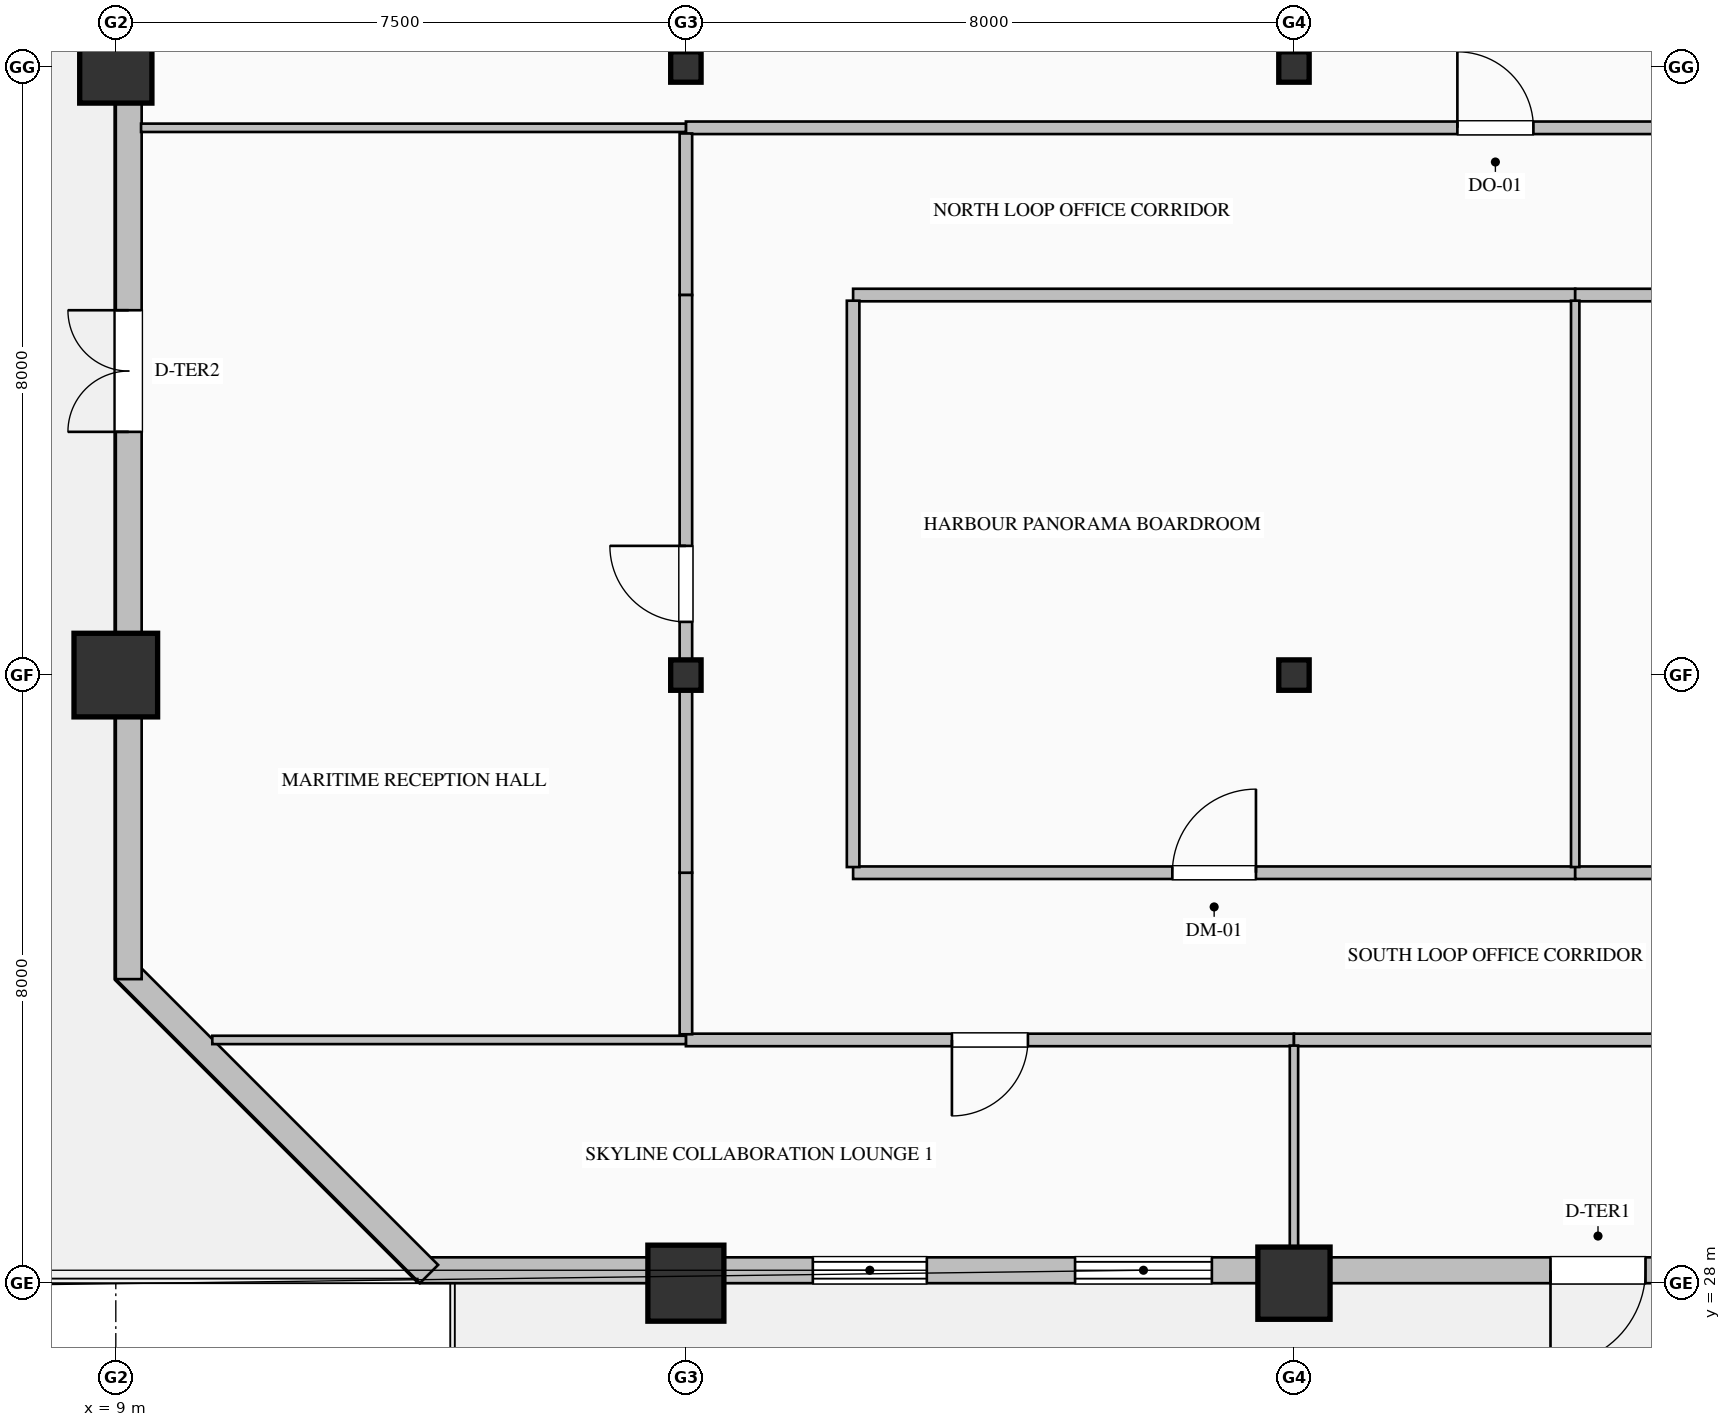
"""IFC4 building model, lengths in metres.
Left out: names, types, materials, properties, quantities, classifications, styles, units other than length and angle.
Written with IfcOpenShell. Run it as: python <this file> out.ifc"""

import sys

from ifc_helpers import new_model, si_unit, direction, frame, frame_2d, origin, origin_2d, place, context, subcontext, project, spatial, rectangle, hollow_rectangle, hollow_circle, i_section, extrude, element, fill, save


model = new_model("IFC4")
c1 = context("Model", 3, precision=1e-05, world=origin(), true_north=direction((0.0, 1.0)))
c2 = subcontext(c1, "Body", "Model", "MODEL_VIEW")
j1 = project(units=[si_unit("LENGTHUNIT", "METRE"), si_unit("PLANEANGLEUNIT", "RADIAN")], contexts=[c1])
p1 = place(None, origin())
s1 = spatial("IfcSite", under=j1, at=p1, CompositionType="ELEMENT")
p2 = place(p1, origin())
s2 = spatial("IfcBuilding", under=s1, at=p2, CompositionType="ELEMENT")
p3 = place(p2, frame((0.0, 0.0, 113.6)))
s3 = spatial("IfcBuildingStorey", under=s2, at=p3, CompositionType="ELEMENT", Elevation=113.6)
p4 = place(p3, frame((9.0, 36.0, 0.0), z_axis=(0.0, 0.0, 1.0), x_axis=(1.0, 0.0, 0.0)))
e1 = element("IfcColumn", 1, at=p4, inside=s3, PredefinedType="COLUMN", context=c2, shape_type="SweptSolid", body=[
    extrude(hollow_rectangle(XDim=1.1, YDim=1.1, WallThickness=0.04, at=origin_2d()), origin(), (0.0, 0.0, 1.0), 5.4),
])
p5 = place(p3, frame((9.0, 44.0, 0.0), z_axis=(0.0, 0.0, 1.0), x_axis=(1.0, 0.0, 0.0)))
e2 = element("IfcColumn", 2, at=p5, inside=s3, PredefinedType="COLUMN", context=c2, shape_type="SweptSolid", body=[
    extrude(hollow_rectangle(XDim=0.95, YDim=0.95, WallThickness=0.036, at=origin_2d()), origin(), (0.0, 0.0, 1.0), 5.4),
])
p6 = place(p3, frame((16.5, 28.0, 0.0), z_axis=(0.0, 0.0, 1.0), x_axis=(1.0, 0.0, 0.0)))
e3 = element("IfcColumn", 3, at=p6, inside=s3, PredefinedType="COLUMN", context=c2, shape_type="SweptSolid", body=[
    extrude(hollow_circle(Radius=0.5, WallThickness=0.036, at=origin_2d()), origin(), (0.0, 0.0, 1.0), 5.4),
])
for number, where, z_axis, x_axis in (
    (4, (16.5, 36.0, 0.0), (0.0, 0.0, 1.0), (1.0, 0.0, 0.0)),
    (5, (16.5, 44.0, 0.0), (0.0, 0.0, 1.0), (1.0, 0.0, 0.0)),
):
    element("IfcColumn", number, at=place(p3, frame(where, z_axis=z_axis, x_axis=x_axis)), inside=s3, PredefinedType="COLUMN", context=c2, shape_type="SweptSolid", body=[
        extrude(i_section(OverallWidth=0.4, OverallDepth=0.4, WebThickness=0.013, FlangeThickness=0.021, FilletRadius=0.022, at=origin_2d()), origin(), (0.0, 0.0, 1.0), 5.4),
    ])
p7 = place(p3, frame((24.5, 28.0, 0.0), z_axis=(0.0, 0.0, 1.0), x_axis=(1.0, 0.0, 0.0)))
e6 = element("IfcColumn", 6, at=p7, inside=s3, PredefinedType="COLUMN", context=c2, shape_type="SweptSolid", body=[
    extrude(hollow_rectangle(XDim=0.95, YDim=0.95, WallThickness=0.036, at=origin_2d()), origin(), (0.0, 0.0, 1.0), 5.4),
])
for number, where, z_axis, x_axis in (
    (7, (24.5, 36.0, 0.0), (0.0, 0.0, 1.0), (1.0, 0.0, 0.0)),
    (8, (24.5, 44.0, 0.0), (0.0, 0.0, 1.0), (1.0, 0.0, 0.0)),
):
    element("IfcColumn", number, at=place(p3, frame(where, z_axis=z_axis, x_axis=x_axis)), inside=s3, PredefinedType="COLUMN", context=c2, shape_type="SweptSolid", body=[
        extrude(i_section(OverallWidth=0.4, OverallDepth=0.4, WebThickness=0.013, FlangeThickness=0.021, FilletRadius=0.022, at=origin_2d()), origin(), (0.0, 0.0, 1.0), 5.4),
    ])
p8 = place(p3, frame((40.52, 28.17, 0.0), z_axis=(0.0, 0.0, 1.0), x_axis=(-1.0, 0.0, 0.0)))
e9 = element("IfcWall", 9, at=p8, inside=s3, PredefinedType="SOLIDWALL", context=c2, shape_type="SweptSolid", body=[
    extrude(rectangle(XDim=27.52, YDim=0.34, at=frame_2d((13.76, 0.0))), origin(), (0.0, 0.0, 1.0), 4.565),
])
p9 = place(p8, frame((17.1, 0.0, 0.65)))
e10 = element("IfcOpeningElement", 10, at=p9, cuts=e9, PredefinedType="OPENING", context=c2, shape_type="SweptSolid", body=[
    extrude(rectangle(XDim=1.8, YDim=2.55, at=frame_2d((0.9, 1.275))), frame((0.0, 0.18, 0.0), z_axis=(0.0, -1.0, 0.0), x_axis=(1.0, 0.0, 0.0)), (0.0, 0.0, 1.0), 0.36),
])
p10 = place(p8, frame((20.85, 0.0, 0.85)))
e11 = element("IfcOpeningElement", 11, at=p10, cuts=e9, PredefinedType="OPENING", context=c2, shape_type="SweptSolid", body=[
    extrude(rectangle(XDim=1.5, YDim=1.95, at=frame_2d((0.75, 0.975))), frame((0.0, 0.18, 0.0), z_axis=(0.0, -1.0, 0.0), x_axis=(1.0, 0.0, 0.0)), (0.0, 0.0, 1.0), 0.36),
])
p11 = place(p8, frame((11.395, 0.0, 0.0)))
e12 = element("IfcOpeningElement", 12, at=p11, cuts=e9, PredefinedType="OPENING", context=c2, shape_type="SweptSolid", body=[
    extrude(rectangle(XDim=1.25, YDim=2.25, at=frame_2d((0.625, 1.125))), frame((0.0, 0.18, 0.0), z_axis=(0.0, -1.0, 0.0), x_axis=(1.0, 0.0, 0.0)), (0.0, 0.0, 1.0), 0.36),
])
p12 = place(p3, frame((13.12, 28.12, 0.0), z_axis=(0.0, 0.0, 1.0), x_axis=(-0.707106781187, 0.707106781187, 0.0)))
e13 = element("IfcWall", 13, at=p12, inside=s3, PredefinedType="SOLIDWALL", context=c2, shape_type="SweptSolid", body=[
    extrude(rectangle(XDim=5.657, YDim=0.34, at=frame_2d((2.828, 0.0))), origin(), (0.0, 0.0, 1.0), 5.165),
])
p13 = place(p3, frame((9.17, 32.0, 0.0), z_axis=(0.0, 0.0, 1.0), x_axis=(0.0, 1.0, 0.0)))
e14 = element("IfcWall", 14, at=p13, inside=s3, PredefinedType="SOLIDWALL", context=c2, shape_type="SweptSolid", body=[
    extrude(rectangle(XDim=16.0, YDim=0.34, at=frame_2d((8.0, 0.0))), origin(), (0.0, 0.0, 1.0), 4.665),
])
p14 = place(p13, frame((7.2, 0.0, 0.0)))
e15 = element("IfcOpeningElement", 15, at=p14, cuts=e14, PredefinedType="OPENING", context=c2, shape_type="SweptSolid", body=[
    extrude(rectangle(XDim=1.6, YDim=2.35, at=frame_2d((0.8, 1.175))), frame((0.0, 0.18, 0.0), z_axis=(0.0, -1.0, 0.0), x_axis=(1.0, 0.0, 0.0)), (0.0, 0.0, 1.0), 0.36),
])
p15 = place(p3, frame((18.7, 33.4, 0.0), z_axis=(0.0, 0.0, 1.0), x_axis=(1.0, 0.0, 0.0)))
e16 = element("IfcWall", 16, at=p15, inside=s3, PredefinedType="PARTITIONING", context=c2, shape_type="SweptSolid", body=[
    extrude(rectangle(XDim=9.5, YDim=0.165, at=frame_2d((4.75, 0.0))), origin(), (0.0, 0.0, 1.0), 5.165),
])
p16 = place(p15, frame((4.2, 0.0, 0.0)))
e17 = element("IfcOpeningElement", 17, at=p16, cuts=e16, PredefinedType="OPENING", context=c2, shape_type="SweptSolid", body=[
    extrude(rectangle(XDim=1.1, YDim=2.2, at=frame_2d((0.55, 1.1))), frame((0.0, 0.093, 0.0), z_axis=(0.0, -1.0, 0.0), x_axis=(1.0, 0.0, 0.0)), (0.0, 0.0, 1.0), 0.185),
])
p17 = place(p3, frame((28.2, 33.4, 0.0), z_axis=(0.0, 0.0, 1.0), x_axis=(1.0, 0.0, 0.0)))
e18 = element("IfcWall", 18, at=p17, inside=s3, PredefinedType="PARTITIONING", context=c2, shape_type="SweptSolid", body=[
    extrude(rectangle(XDim=9.6, YDim=0.165, at=frame_2d((4.8, 0.0))), origin(), (0.0, 0.0, 1.0), 5.165),
])
p18 = place(p17, frame((4.3, 0.0, 0.0)))
e19 = element("IfcOpeningElement", 19, at=p18, cuts=e18, PredefinedType="OPENING", context=c2, shape_type="SweptSolid", body=[
    extrude(rectangle(XDim=1.0, YDim=2.15, at=frame_2d((0.5, 1.075))), frame((0.0, 0.093, 0.0), z_axis=(0.0, -1.0, 0.0), x_axis=(1.0, 0.0, 0.0)), (0.0, 0.0, 1.0), 0.185),
])
p19 = place(p3, frame((24.5, 31.2, 0.0), z_axis=(0.0, 0.0, 1.0), x_axis=(-1.0, 0.0, 0.0)))
e20 = element("IfcWall", 20, at=p19, inside=s3, PredefinedType="PARTITIONING", context=c2, shape_type="SweptSolid", body=[
    extrude(rectangle(XDim=8.0, YDim=0.165, at=frame_2d((4.0, 0.0))), origin(), (0.0, 0.0, 1.0), 5.165),
])
p20 = place(p19, frame((3.5, 0.0, 0.0)))
e21 = element("IfcOpeningElement", 21, at=p20, cuts=e20, PredefinedType="OPENING", context=c2, shape_type="SweptSolid", body=[
    extrude(rectangle(XDim=1.0, YDim=2.15, at=frame_2d((0.5, 1.075))), frame((0.0, 0.093, 0.0), z_axis=(0.0, -1.0, 0.0), x_axis=(1.0, 0.0, 0.0)), (0.0, 0.0, 1.0), 0.185),
])
p21 = place(p3, frame((37.8, 31.2, 0.0), z_axis=(0.0, 0.0, 1.0), x_axis=(-1.0, 0.0, 0.0)))
e22 = element("IfcWall", 22, at=p21, inside=s3, PredefinedType="PARTITIONING", context=c2, shape_type="SweptSolid", body=[
    extrude(rectangle(XDim=13.3, YDim=0.165, at=frame_2d((6.65, 0.0))), origin(), (0.0, 0.0, 1.0), 5.165),
])
p22 = place(p21, frame((6.15, 0.0, 0.0)))
e23 = element("IfcOpeningElement", 23, at=p22, cuts=e22, PredefinedType="OPENING", context=c2, shape_type="SweptSolid", body=[
    extrude(rectangle(XDim=1.0, YDim=2.15, at=frame_2d((0.5, 1.075))), frame((0.0, 0.093, 0.0), z_axis=(0.0, -1.0, 0.0), x_axis=(1.0, 0.0, 0.0)), (0.0, 0.0, 1.0), 0.185),
])
p23 = place(p3, frame((16.5, 31.274, 0.0), z_axis=(0.0, 0.0, 1.0), x_axis=(0.0, 1.0, 0.0)))
e24 = element("IfcWall", 24, at=p23, inside=s3, PredefinedType="PARTITIONING", context=c2, shape_type="SweptSolid", body=[
    extrude(rectangle(XDim=2.125, YDim=0.165, at=frame_2d((1.063, 0.0))), origin(), (0.0, 0.0, 1.0), 4.557),
])
p24 = place(p3, frame((16.5, 43.2, 0.0), z_axis=(0.0, 0.0, 1.0), x_axis=(1.0, 0.0, 0.0)))
e25 = element("IfcWall", 25, at=p24, inside=s3, PredefinedType="PARTITIONING", context=c2, shape_type="SweptSolid", body=[
    extrude(rectangle(XDim=21.3, YDim=0.165, at=frame_2d((10.65, 0.0))), origin(), (0.0, 0.0, 1.0), 5.165),
])
p25 = place(p24, frame((10.15, 0.0, 0.0)))
e26 = element("IfcOpeningElement", 26, at=p25, cuts=e25, PredefinedType="OPENING", context=c2, shape_type="SweptSolid", body=[
    extrude(rectangle(XDim=1.0, YDim=2.15, at=frame_2d((0.5, 1.075))), frame((0.0, 0.093, 0.0), z_axis=(0.0, -1.0, 0.0), x_axis=(1.0, 0.0, 0.0)), (0.0, 0.0, 1.0), 0.185),
])
p26 = place(p3, frame((28.2, 41.0, 0.0), z_axis=(0.0, 0.0, 1.0), x_axis=(-1.0, 0.0, 0.0)))
e27 = element("IfcWall", 27, at=p26, inside=s3, PredefinedType="PARTITIONING", context=c2, shape_type="SweptSolid", body=[
    extrude(rectangle(XDim=9.5, YDim=0.165, at=frame_2d((4.75, 0.0))), origin(), (0.0, 0.0, 1.0), 5.165),
])
p27 = place(p3, frame((37.8, 41.0, 0.0), z_axis=(0.0, 0.0, 1.0), x_axis=(-1.0, 0.0, 0.0)))
e28 = element("IfcWall", 28, at=p27, inside=s3, PredefinedType="PARTITIONING", context=c2, shape_type="SweptSolid", body=[
    extrude(rectangle(XDim=9.6, YDim=0.165, at=frame_2d((4.8, 0.0))), origin(), (0.0, 0.0, 1.0), 5.165),
])
p28 = place(p3, frame((16.5, 41.0, 0.0), z_axis=(0.0, 0.0, 1.0), x_axis=(0.0, 1.0, 0.0)))
e29 = element("IfcWall", 29, at=p28, inside=s3, PredefinedType="PARTITIONING", context=c2, shape_type="SweptSolid", body=[
    extrude(rectangle(XDim=2.125, YDim=0.165, at=frame_2d((1.063, 0.0))), origin(), (0.0, 0.0, 1.0), 4.557),
])
p29 = place(p3, frame((18.7, 40.926, 0.0), z_axis=(0.0, 0.0, 1.0), x_axis=(0.0, -1.0, 0.0)))
e30 = element("IfcWall", 30, at=p29, inside=s3, PredefinedType="PARTITIONING", context=c2, shape_type="SweptSolid", body=[
    extrude(rectangle(XDim=7.451, YDim=0.165, at=frame_2d((3.726, 0.0))), origin(), (0.0, 0.0, 1.0), 5.165),
])
p30 = place(p3, frame((16.5, 33.4, 0.0), z_axis=(0.0, 0.0, 1.0), x_axis=(0.0, 1.0, 0.0)))
e31 = element("IfcWall", 31, at=p30, inside=s3, PredefinedType="PARTITIONING", context=c2, shape_type="SweptSolid", body=[
    extrude(rectangle(XDim=7.6, YDim=0.165, at=frame_2d((3.8, 0.0))), origin(), (0.0, 0.0, 1.0), 4.557),
])
p31 = place(p30, frame((3.3, 0.0, 0.0)))
e32 = element("IfcOpeningElement", 32, at=p31, cuts=e31, PredefinedType="OPENING", context=c2, shape_type="SweptSolid", body=[
    extrude(rectangle(XDim=1.0, YDim=2.15, at=frame_2d((0.5, 1.075))), frame((0.0, 0.093, 0.0), z_axis=(0.0, -1.0, 0.0), x_axis=(1.0, 0.0, 0.0)), (0.0, 0.0, 1.0), 0.185),
])
p32 = place(p3, frame((16.5, 43.2, 0.0), z_axis=(0.0, 0.0, 1.0), x_axis=(-1.0, 0.0, 0.0)))
e33 = element("IfcWall", 33, at=p32, inside=s3, PredefinedType="MOVABLE", context=c2, shape_type="SweptSolid", body=[
    extrude(rectangle(XDim=7.168, YDim=0.11, at=frame_2d((3.584, 0.0))), origin(), (0.0, 0.0, 1.0), 5.165),
])
p33 = place(p3, frame((28.2, 40.926, 0.0), z_axis=(0.0, 0.0, 1.0), x_axis=(0.0, -1.0, 0.0)))
e34 = element("IfcWall", 34, at=p33, inside=s3, PredefinedType="MOVABLE", context=c2, shape_type="SweptSolid", body=[
    extrude(rectangle(XDim=7.451, YDim=0.11, at=frame_2d((3.726, 0.0))), origin(), (0.0, 0.0, 1.0), 5.165),
])
p34 = place(p3, frame((24.5, 31.125, 0.0), z_axis=(0.0, 0.0, 1.0), x_axis=(0.0, -1.0, 0.0)))
e35 = element("IfcWall", 35, at=p34, inside=s3, PredefinedType="MOVABLE", context=c2, shape_type="SweptSolid", body=[
    extrude(rectangle(XDim=2.793, YDim=0.11, at=frame_2d((1.397, 0.0))), origin(), (0.0, 0.0, 1.0), 4.557),
])
p35 = place(p3, frame((10.27, 31.2, 0.0), z_axis=(0.0, 0.0, 1.0), x_axis=(1.0, 0.0, 0.0)))
e36 = element("IfcWall", 36, at=p35, inside=s3, PredefinedType="MOVABLE", context=c2, shape_type="SweptSolid", body=[
    extrude(rectangle(XDim=6.23, YDim=0.11, at=frame_2d((3.115, 0.0))), origin(), (0.0, 0.0, 1.0), 5.165),
])
p36 = place(p9, origin())
e37 = element("IfcWindow", 37, at=p36, inside=s3, PartitioningType="TRIPLE_PANEL_VERTICAL", PredefinedType="WINDOW", context=c2, shape_type="SweptSolid", body=[
    extrude(rectangle(XDim=1.8, YDim=2.55, at=frame_2d((0.9, 1.275))), frame((0.0, 0.15, 0.0), z_axis=(0.0, -1.0, 0.0), x_axis=(1.0, 0.0, 0.0)), (0.0, 0.0, 1.0), 0.06),
])
fill(e10, e37)
p37 = place(p10, origin())
e38 = element("IfcWindow", 38, at=p37, inside=s3, PartitioningType="DOUBLE_PANEL_VERTICAL", PredefinedType="WINDOW", context=c2, shape_type="SweptSolid", body=[
    extrude(rectangle(XDim=1.5, YDim=1.95, at=frame_2d((0.75, 0.975))), frame((0.0, 0.15, 0.0), z_axis=(0.0, -1.0, 0.0), x_axis=(1.0, 0.0, 0.0)), (0.0, 0.0, 1.0), 0.06),
])
fill(e11, e38)
p38 = place(p14, origin())
e39 = element("IfcDoor", 39, at=p38, inside=s3, OperationType="DOUBLE_DOOR_SINGLE_SWING", PredefinedType="DOOR", context=c2, shape_type="SweptSolid", body=[
    extrude(rectangle(XDim=1.6, YDim=2.35, at=frame_2d((0.8, 1.175))), frame((0.0, 0.025, 0.0), z_axis=(0.0, -1.0, 0.0), x_axis=(1.0, 0.0, 0.0)), (0.0, 0.0, 1.0), 0.05),
])
fill(e15, e39)
p39 = place(p11, origin())
e40 = element("IfcDoor", 40, at=p39, inside=s3, OperationType="SINGLE_SWING_RIGHT", PredefinedType="DOOR", context=c2, shape_type="SweptSolid", body=[
    extrude(rectangle(XDim=1.25, YDim=2.25, at=frame_2d((0.625, 1.125))), frame((0.0, 0.025, 0.0), z_axis=(0.0, -1.0, 0.0), x_axis=(1.0, 0.0, 0.0)), (0.0, 0.0, 1.0), 0.05),
])
fill(e12, e40)
p40 = place(p25, origin())
e41 = element("IfcDoor", 41, at=p40, inside=s3, OperationType="SINGLE_SWING_LEFT", PredefinedType="DOOR", context=c2, shape_type="SweptSolid", body=[
    extrude(rectangle(XDim=1.0, YDim=2.15, at=frame_2d((0.5, 1.075))), frame((0.0, 0.025, 0.0), z_axis=(0.0, -1.0, 0.0), x_axis=(1.0, 0.0, 0.0)), (0.0, 0.0, 1.0), 0.05),
])
fill(e26, e41)
p41 = place(p16, origin())
e42 = element("IfcDoor", 42, at=p41, inside=s3, OperationType="SINGLE_SWING_RIGHT", PredefinedType="DOOR", context=c2, shape_type="SweptSolid", body=[
    extrude(rectangle(XDim=1.1, YDim=2.2, at=frame_2d((0.55, 1.1))), frame((0.0, 0.025, 0.0), z_axis=(0.0, -1.0, 0.0), x_axis=(1.0, 0.0, 0.0)), (0.0, 0.0, 1.0), 0.05),
])
fill(e17, e42)
p42 = place(p20, origin())
e43 = element("IfcDoor", 43, at=p42, inside=s3, OperationType="SINGLE_SWING_RIGHT", PredefinedType="DOOR", context=c2, shape_type="SweptSolid", body=[
    extrude(rectangle(XDim=1.0, YDim=2.15, at=frame_2d((0.5, 1.075))), frame((0.0, 0.025, 0.0), z_axis=(0.0, -1.0, 0.0), x_axis=(1.0, 0.0, 0.0)), (0.0, 0.0, 1.0), 0.05),
])
fill(e21, e43)
p43 = place(p31, origin())
e44 = element("IfcDoor", 44, at=p43, inside=s3, OperationType="SINGLE_SWING_RIGHT", PredefinedType="DOOR", context=c2, shape_type="SweptSolid", body=[
    extrude(rectangle(XDim=1.0, YDim=2.15, at=frame_2d((0.5, 1.075))), frame((0.0, 0.025, 0.0), z_axis=(0.0, -1.0, 0.0), x_axis=(1.0, 0.0, 0.0)), (0.0, 0.0, 1.0), 0.05),
])
fill(e32, e44)
save(model, sys.argv[1])
